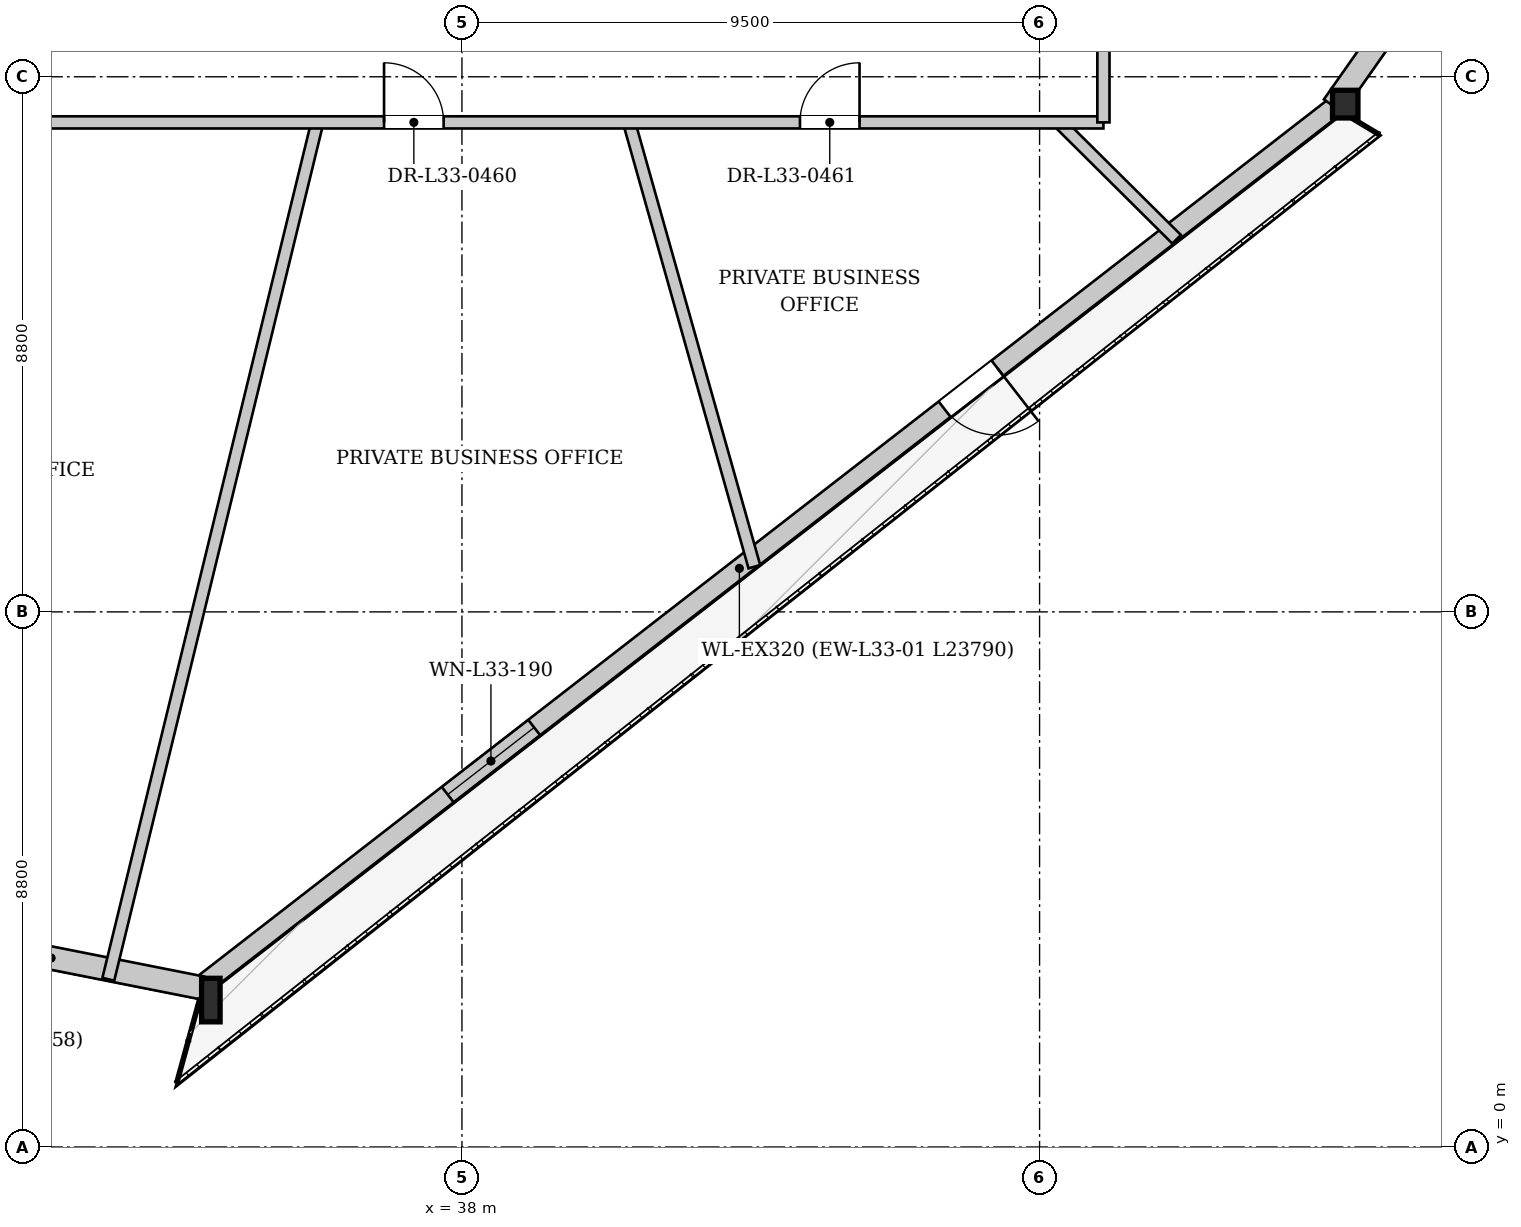
"""IFC4 building model, lengths in metres.
Left out: names, types, materials, properties, quantities, classifications, styles, units other than length and angle.
Written with IfcOpenShell. Run it as: python <this file> out.ifc"""

import sys

from ifc_helpers import new_model, si_unit, direction, frame, frame_2d, origin, origin_2d, place, context, subcontext, project, spatial, rectangle, i_section, extrude, source, transform, mapped, element, fill, save


model = new_model("IFC4")
c1 = context("Model", 3, precision=1e-05, world=origin(), true_north=direction((0.0, 1.0)))
c2 = subcontext(c1, "Body", "Model", "MODEL_VIEW")
j1 = project(units=[si_unit("LENGTHUNIT", "METRE"), si_unit("PLANEANGLEUNIT", "RADIAN")], contexts=[c1])
p1 = place(None, origin())
s1 = spatial("IfcSite", under=j1, at=p1, CompositionType="ELEMENT")
p2 = place(p1, origin())
s2 = spatial("IfcBuilding", under=s1, at=p2, CompositionType="ELEMENT")
p3 = place(p2, frame((0.0, 0.0, 127.0)))
s3 = spatial("IfcBuildingStorey", under=s2, at=p3, CompositionType="ELEMENT", Elevation=127.0)
m1 = source(origin(), c2, "Body", "SweptSolid", [
    extrude(i_section(OverallWidth=0.304, OverallDepth=0.716, WebThickness=0.021, FlangeThickness=0.04, at=origin_2d()), origin(), (0.0, 0.0, 1.0), 3.405),
])
p4 = place(p3, frame((33.687, 2.43, 0.0), z_axis=(0.107554746128, -0.008317567034, 0.994164370043), x_axis=(0.077103121545, 0.997023123427, 0.0)))
e1 = element("IfcColumn", 1, at=p4, inside=s3, PredefinedType="COLUMN", context=c2, shape_type="MappedRepresentation", body=[
    mapped(m1, transform((0.0, 0.0, 0.0), x_axis=(1.0, 0.0, 0.0), y_axis=(0.0, 1.0, 0.0), z_axis=(0.0, 0.0, 1.0), scale=1.0)),
])
m2 = source(origin(), c2, "Body", "SweptSolid", [
    extrude(i_section(OverallWidth=0.418, OverallDepth=0.455, WebThickness=0.038, FlangeThickness=0.059, at=origin_2d()), origin(), (0.0, 0.0, 1.0), 3.398),
])
p5 = place(p3, frame((52.487, 17.01, 0.0), z_axis=(0.023784635313, 0.082635439911, 0.996295977706), x_axis=(-0.960986046082, 0.276596853264, 0.0)))
e2 = element("IfcColumn", 2, at=p5, inside=s3, PredefinedType="COLUMN", context=c2, shape_type="MappedRepresentation", body=[
    mapped(m2, transform((0.0, 0.0, 0.0), x_axis=(1.0, 0.0, 0.0), y_axis=(0.0, 1.0, 0.0), z_axis=(0.0, 0.0, 1.0), scale=1.0)),
])
p6 = place(p3, frame((52.388, 17.136, 0.0), z_axis=(0.0, 0.0, 1.0), x_axis=(-0.790214020135, -0.612830973746, 0.0)))
e3 = element("IfcWall", 3, at=p6, inside=s3, PredefinedType="SOLIDWALL", context=c2, shape_type="SweptSolid", body=[
    extrude(rectangle(XDim=23.79, YDim=0.32, at=frame_2d((11.895, 0.0))), origin(), (0.0, 0.0, 1.0), 2.692),
])
p7 = place(p6, frame((7.063, 0.0, 0.0)))
e4 = element("IfcOpeningElement", 4, at=p7, cuts=e3, PredefinedType="OPENING", context=c2, shape_type="SweptSolid", body=[
    extrude(rectangle(XDim=1.1, YDim=2.3, at=frame_2d((0.55, 1.15))), frame((0.0, 0.17, 0.0), z_axis=(0.0, -1.0, 0.0), x_axis=(1.0, 0.0, 0.0)), (0.0, 0.0, 1.0), 0.34),
])
p8 = place(p6, frame((16.705, 0.0, 0.372)))
e5 = element("IfcOpeningElement", 5, at=p8, cuts=e3, PredefinedType="OPENING", context=c2, shape_type="SweptSolid", body=[
    extrude(rectangle(XDim=1.8, YDim=2.2, at=frame_2d((0.9, 1.1))), frame((0.0, 0.17, 0.0), z_axis=(0.0, -1.0, 0.0), x_axis=(1.0, 0.0, 0.0)), (0.0, 0.0, 1.0), 0.34),
])
p9 = place(p3, frame((33.724, 2.617, 0.0), z_axis=(0.0, 0.0, 1.0), x_axis=(-0.980957549711, 0.194222258416, 0.0)))
e6 = element("IfcWall", 6, at=p9, inside=s3, PredefinedType="SOLIDWALL", context=c2, shape_type="SweptSolid", body=[
    extrude(rectangle(XDim=5.058, YDim=0.38, at=frame_2d((2.529, 0.0))), origin(), (0.0, 0.0, 1.0), 2.692),
])
p10 = place(p3, frame((66.009, 36.584, 0.0), z_axis=(0.0, 0.0, 1.0), x_axis=(-0.574933262146, -0.818200308041, 0.0)))
e7 = element("IfcWall", 7, at=p10, inside=s3, PredefinedType="SOLIDWALL", context=c2, shape_type="SweptSolid", body=[
    extrude(rectangle(XDim=23.79, YDim=0.38, at=frame_2d((11.895, 0.0))), origin(), (0.0, 0.0, 1.0), 2.692),
])
p11 = place(p10, frame((5.561, 0.0, 0.322)))
e8 = element("IfcOpeningElement", 8, at=p11, cuts=e7, PredefinedType="OPENING", context=c2, shape_type="SweptSolid", body=[
    extrude(rectangle(XDim=2.2, YDim=2.25, at=frame_2d((1.1, 1.125))), frame((0.0, 0.2, 0.0), z_axis=(0.0, -1.0, 0.0), x_axis=(1.0, 0.0, 0.0)), (0.0, 0.0, 1.0), 0.4),
])
p12 = place(p10, frame((16.779, 0.0, 0.322)))
e9 = element("IfcOpeningElement", 9, at=p12, cuts=e7, PredefinedType="OPENING", context=c2, shape_type="SweptSolid", body=[
    extrude(rectangle(XDim=2.2, YDim=2.25, at=frame_2d((1.1, 1.125))), frame((0.0, 0.2, 0.0), z_axis=(0.0, -1.0, 0.0), x_axis=(1.0, 0.0, 0.0)), (0.0, 0.0, 1.0), 0.4),
])
p13 = place(p3, frame((35.622, 16.85, 0.0), z_axis=(0.0, 0.0, 1.0), x_axis=(-0.236994928631, -0.971510887125, 0.0)))
e10 = element("IfcWall", 10, at=p13, inside=s3, PredefinedType="PARTITIONING", context=c2, shape_type="SweptSolid", body=[
    extrude(rectangle(XDim=14.505, YDim=0.2, at=frame_2d((7.252, 0.0))), origin(), (0.0, 0.0, 1.0), 3.3),
])
p14 = place(p3, frame((40.749, 16.85, 0.0), z_axis=(0.0, 0.0, 1.0), x_axis=(0.271368511956, -0.96247552214, 0.0)))
e11 = element("IfcWall", 11, at=p14, inside=s3, PredefinedType="PARTITIONING", context=c2, shape_type="SweptSolid", body=[
    extrude(rectangle(XDim=7.592, YDim=0.2, at=frame_2d((3.796, 0.0))), origin(), (0.0, 0.0, 1.0), 3.3),
])
p15 = place(p3, frame((47.818, 16.85, 0.0), z_axis=(0.0, 0.0, 1.0), x_axis=(0.709519636275, -0.704685664491, 0.0)))
e12 = element("IfcWall", 12, at=p15, inside=s3, PredefinedType="PARTITIONING", context=c2, shape_type="SweptSolid", body=[
    extrude(rectangle(XDim=2.727, YDim=0.2, at=frame_2d((1.364, 0.0))), origin(), (0.0, 0.0, 1.0), 3.3),
])
p16 = place(p3, frame((27.45, 16.85, 0.0), z_axis=(0.0, 0.0, 1.0), x_axis=(1.0, 0.0, 0.0)))
e13 = element("IfcWall", 13, at=p16, inside=s3, PredefinedType="PARTITIONING", context=c2, shape_type="SweptSolid", body=[
    extrude(rectangle(XDim=21.1, YDim=0.2, at=frame_2d((10.55, 0.0))), origin(), (0.0, 0.0, 1.0), 3.3),
])
p17 = place(p16, frame((2.412, 0.0, 0.0)))
e14 = element("IfcOpeningElement", 14, at=p17, cuts=e13, PredefinedType="OPENING", context=c2, shape_type="SweptSolid", body=[
    extrude(rectangle(XDim=0.98, YDim=2.15, at=frame_2d((0.49, 1.075))), frame((0.0, 0.11, 0.0), z_axis=(0.0, -1.0, 0.0), x_axis=(1.0, 0.0, 0.0)), (0.0, 0.0, 1.0), 0.22),
])
p18 = place(p16, frame((9.269, 0.0, 0.0)))
e15 = element("IfcOpeningElement", 15, at=p18, cuts=e13, PredefinedType="OPENING", context=c2, shape_type="SweptSolid", body=[
    extrude(rectangle(XDim=0.98, YDim=2.15, at=frame_2d((0.49, 1.075))), frame((0.0, 0.11, 0.0), z_axis=(0.0, -1.0, 0.0), x_axis=(1.0, 0.0, 0.0)), (0.0, 0.0, 1.0), 0.22),
])
p19 = place(p16, frame((16.109, 0.0, 0.0)))
e16 = element("IfcOpeningElement", 16, at=p19, cuts=e13, PredefinedType="OPENING", context=c2, shape_type="SweptSolid", body=[
    extrude(rectangle(XDim=0.98, YDim=2.15, at=frame_2d((0.49, 1.075))), frame((0.0, 0.11, 0.0), z_axis=(0.0, -1.0, 0.0), x_axis=(1.0, 0.0, 0.0)), (0.0, 0.0, 1.0), 0.22),
])
p20 = place(p3, frame((48.55, 16.85, 0.0), z_axis=(0.0, 0.0, 1.0), x_axis=(0.0, 1.0, 0.0)))
e17 = element("IfcWall", 17, at=p20, inside=s3, PredefinedType="PARTITIONING", context=c2, shape_type="SweptSolid", body=[
    extrude(rectangle(XDim=19.5, YDim=0.2, at=frame_2d((9.75, 0.0))), origin(), (0.0, 0.0, 1.0), 3.3),
])
p21 = place(p20, frame((10.443, 0.0, 0.0)))
e18 = element("IfcOpeningElement", 18, at=p21, cuts=e17, PredefinedType="OPENING", context=c2, shape_type="SweptSolid", body=[
    extrude(rectangle(XDim=0.98, YDim=2.15, at=frame_2d((0.49, 1.075))), frame((0.0, 0.11, 0.0), z_axis=(0.0, -1.0, 0.0), x_axis=(1.0, 0.0, 0.0)), (0.0, 0.0, 1.0), 0.22),
])
p22 = place(p20, frame((1.975, 0.0, 0.0)))
e19 = element("IfcOpeningElement", 19, at=p22, cuts=e17, PredefinedType="OPENING", context=c2, shape_type="SweptSolid", body=[
    extrude(rectangle(XDim=0.98, YDim=2.15, at=frame_2d((0.49, 1.075))), frame((0.0, 0.11, 0.0), z_axis=(0.0, -1.0, 0.0), x_axis=(1.0, 0.0, 0.0)), (0.0, 0.0, 1.0), 0.22),
])
m3 = source(origin(), c2, "Body", "SweptSolid", [
    extrude(rectangle(XDim=1.1, YDim=2.3, at=frame_2d((0.55, 1.15))), frame((0.0, 0.025, 0.0), z_axis=(0.0, -1.0, 0.0), x_axis=(1.0, 0.0, 0.0)), (0.0, 0.0, 1.0), 0.05),
])
p23 = place(p7, origin())
e20 = element("IfcDoor", 20, at=p23, inside=s3, OperationType="SINGLE_SWING_LEFT", PredefinedType="DOOR", context=c2, shape_type="MappedRepresentation", body=[
    mapped(m3, transform((0.0, 0.0, 0.0), x_axis=(1.0, 0.0, 0.0), y_axis=(0.0, 1.0, 0.0), z_axis=(0.0, 0.0, 1.0), scale=1.0)),
])
fill(e4, e20)
m4 = source(origin(), c2, "Body", "SweptSolid", [
    extrude(rectangle(XDim=1.8, YDim=2.2, at=frame_2d((0.9, 1.1))), frame((0.0, 0.03, 0.0), z_axis=(0.0, -1.0, 0.0), x_axis=(1.0, 0.0, 0.0)), (0.0, 0.0, 1.0), 0.06),
])
p24 = place(p8, origin())
e21 = element("IfcWindow", 21, at=p24, inside=s3, PartitioningType="SINGLE_PANEL", PredefinedType="WINDOW", context=c2, shape_type="MappedRepresentation", body=[
    mapped(m4, transform((0.0, 0.0, 0.0), x_axis=(1.0, 0.0, 0.0), y_axis=(0.0, 1.0, 0.0), z_axis=(0.0, 0.0, 1.0), scale=1.0)),
])
fill(e5, e21)
m5 = source(origin(), c2, "Body", "SweptSolid", [
    extrude(rectangle(XDim=0.98, YDim=2.15, at=frame_2d((0.49, 1.075))), frame((0.0, 0.025, 0.0), z_axis=(0.0, -1.0, 0.0), x_axis=(1.0, 0.0, 0.0)), (0.0, 0.0, 1.0), 0.05),
])
p25 = place(p18, origin())
e22 = element("IfcDoor", 22, at=p25, inside=s3, OperationType="SINGLE_SWING_LEFT", PredefinedType="DOOR", context=c2, shape_type="MappedRepresentation", body=[
    mapped(m5, transform((0.0, 0.0, 0.0), x_axis=(1.0, 0.0, 0.0), y_axis=(0.0, 1.0, 0.0), z_axis=(0.0, 0.0, 1.0), scale=1.0)),
])
fill(e15, e22)
p26 = place(p19, origin())
e23 = element("IfcDoor", 23, at=p26, inside=s3, OperationType="SINGLE_SWING_RIGHT", PredefinedType="DOOR", context=c2, shape_type="MappedRepresentation", body=[
    mapped(m5, transform((0.0, 0.0, 0.0), x_axis=(1.0, 0.0, 0.0), y_axis=(0.0, 1.0, 0.0), z_axis=(0.0, 0.0, 1.0), scale=1.0)),
])
fill(e16, e23)
save(model, sys.argv[1])
